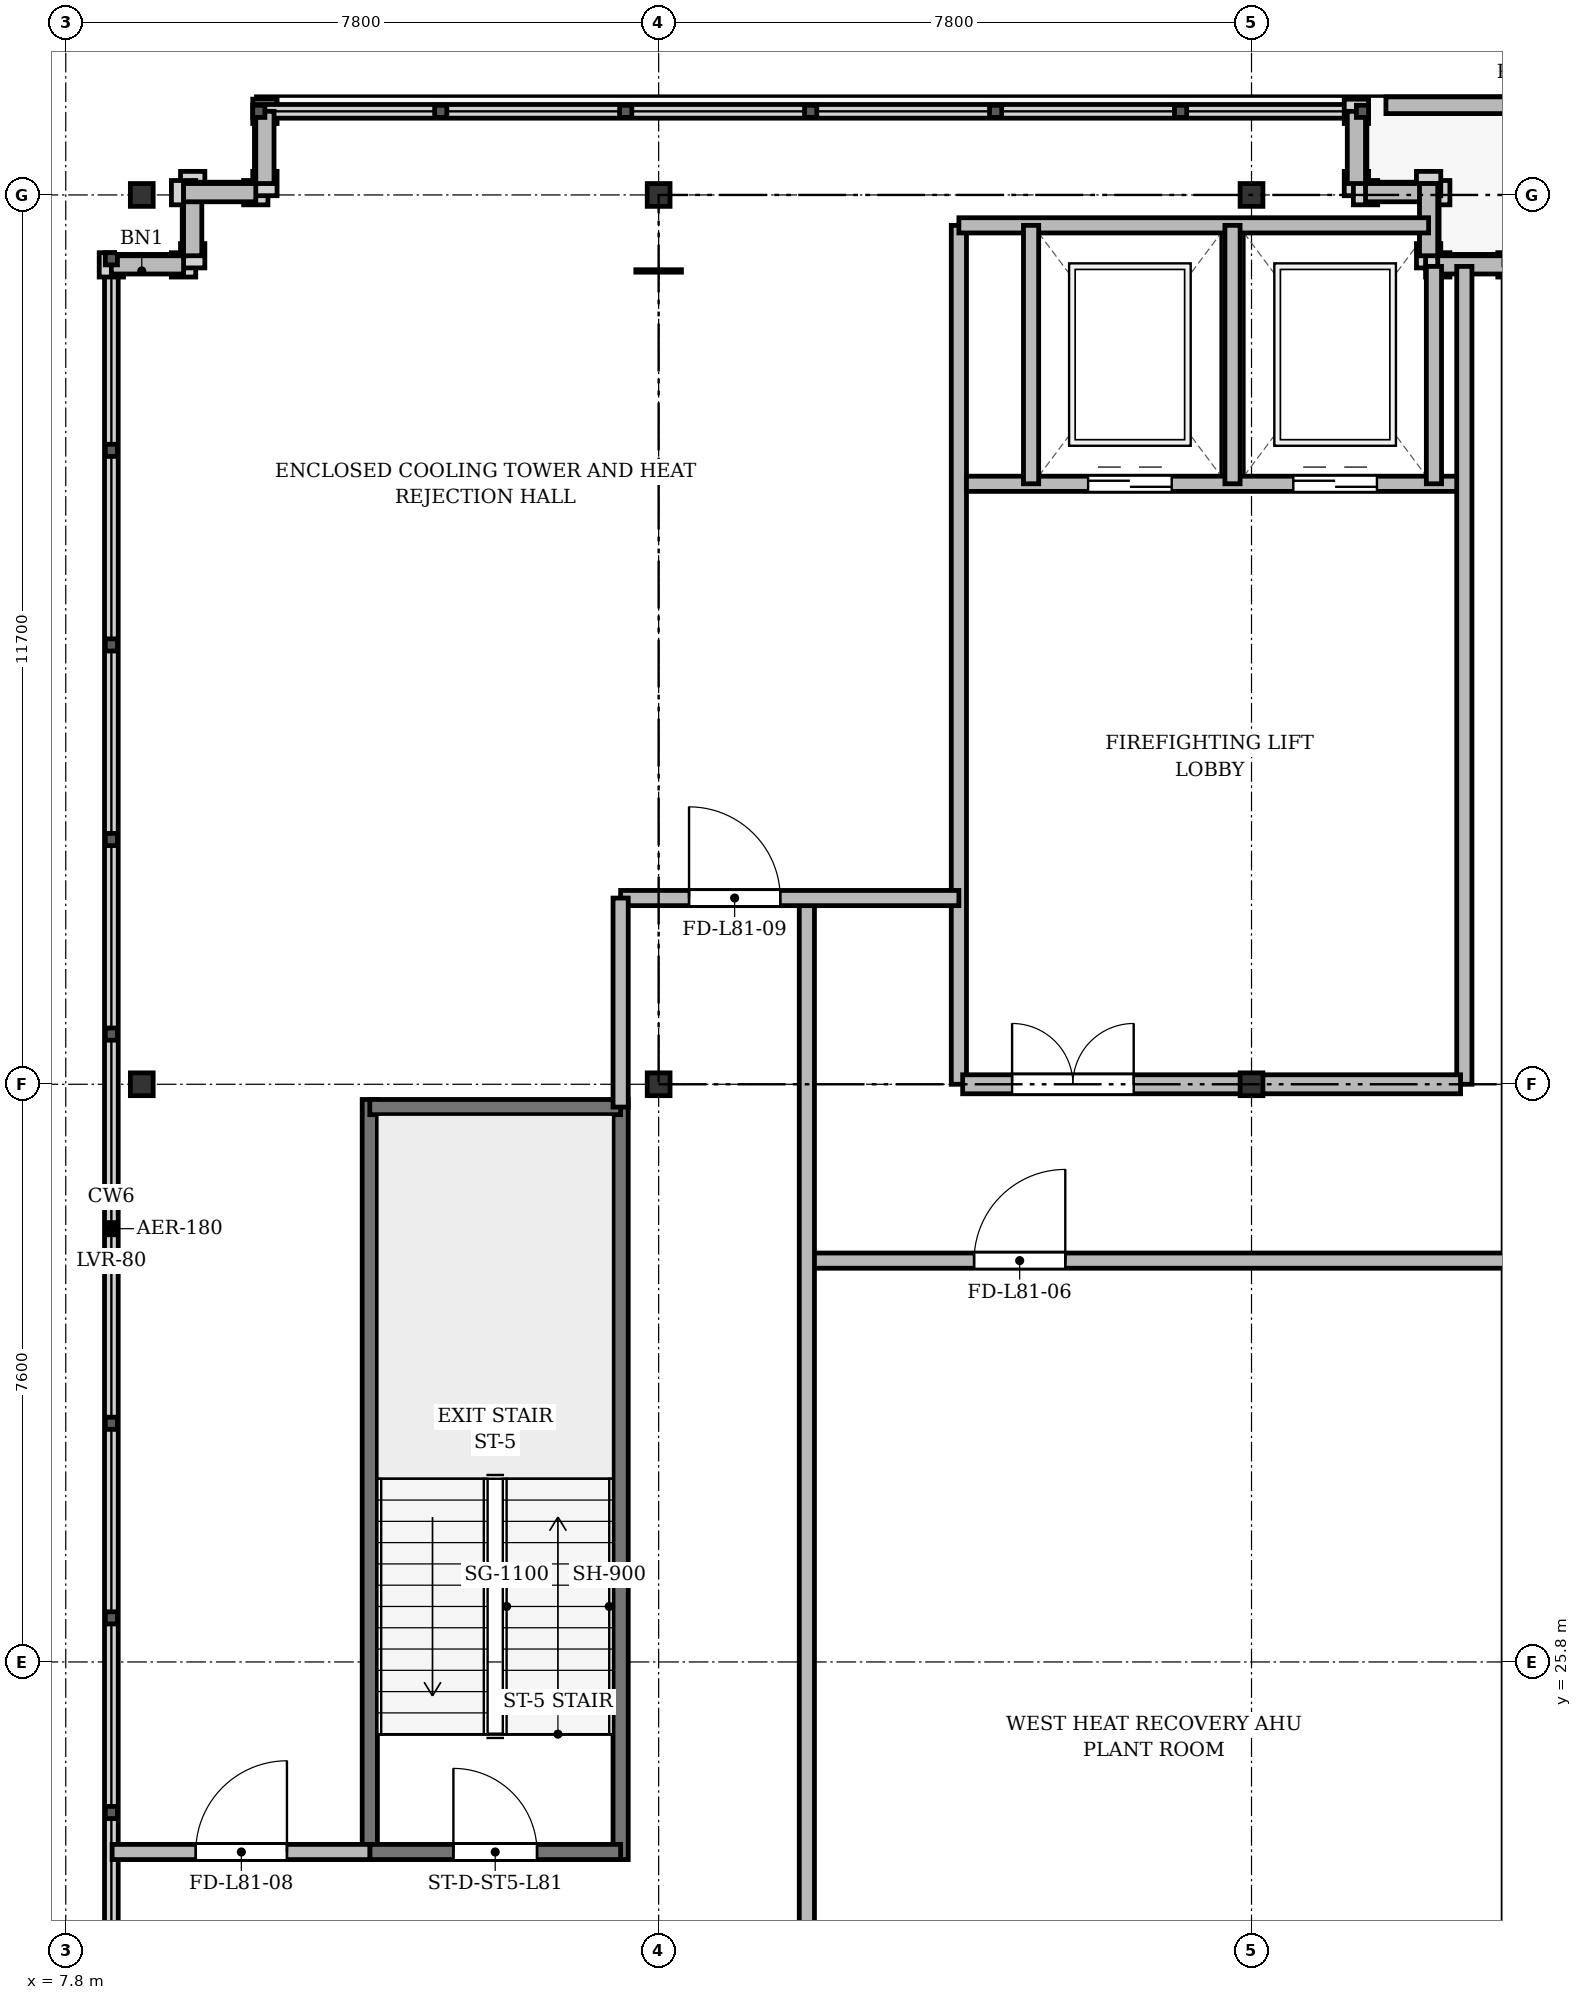
"""IFC4 building model, lengths in metres.
Left out: names, types, materials, properties, quantities, classifications, styles, units other than length and angle.
Written with IfcOpenShell. Run it as: python <this file> out.ifc"""

import sys

from ifc_helpers import new_model, si_unit, direction, frame, frame_2d, origin, origin_2d, place, context, subcontext, project, spatial, rectangle, i_section, extrude, source, transform, mapped, element, fill, save


model = new_model("IFC4")
c1 = context("Model", 3, precision=1e-05, world=origin(), true_north=direction((0.0, 1.0)))
c2 = subcontext(c1, "Body", "Model", "MODEL_VIEW")
j1 = project(units=[si_unit("LENGTHUNIT", "METRE"), si_unit("PLANEANGLEUNIT", "RADIAN")], contexts=[c1])
p1 = place(None, origin())
s1 = spatial("IfcSite", under=j1, at=p1, CompositionType="ELEMENT")
p2 = place(p1, origin())
s2 = spatial("IfcBuilding", under=s1, at=p2, CompositionType="ELEMENT")
p3 = place(p2, frame((0.0, 0.0, 312.3)))
s3 = spatial("IfcBuildingStorey", under=s2, at=p3, CompositionType="ELEMENT", Elevation=312.3)
m1 = source(origin(), c2, "Body", "SweptSolid", [
    extrude(i_section(OverallWidth=0.3, OverallDepth=0.3, WebThickness=0.015, FlangeThickness=0.024, at=origin_2d()), origin(), (0.0, 0.0, 1.0), 4.4),
])
for number, where, z_axis, x_axis in (
    (1, (8.8, 33.4, 0.0), (0.0, 0.0, 1.0), (1.0, 0.0, 0.0)),
    (2, (8.8, 45.1, 0.0), (0.0, 0.0, 1.0), (1.0, 0.0, 0.0)),
    (3, (15.6, 33.4, 0.0), (0.0, 0.0, 1.0), (1.0, 0.0, 0.0)),
    (4, (15.6, 45.1, 0.0), (0.0, 0.0, 1.0), (1.0, 0.0, 0.0)),
    (5, (23.4, 33.4, 0.0), (0.0, 0.0, 1.0), (1.0, 0.0, 0.0)),
    (6, (23.4, 45.1, 0.0), (0.0, 0.0, 1.0), (1.0, 0.0, 0.0)),
):
    element("IfcColumn", number, at=place(p3, frame(where, z_axis=z_axis, x_axis=x_axis)), inside=s3, PredefinedType="COLUMN", context=c2, shape_type="MappedRepresentation", body=[
        mapped(m1, transform((0.0, 0.0, 0.0), x_axis=(1.0, 0.0, 0.0), y_axis=(0.0, 1.0, 0.0), z_axis=(0.0, 0.0, 1.0), scale=1.0)),
    ])
p4 = place(p3, frame((8.4, 44.18, 0.0), z_axis=(0.0, 0.0, 1.0), x_axis=(1.0, 0.0, 0.0)))
e7 = element("IfcWall", 7, at=p4, inside=s3, PredefinedType="SOLIDWALL", context=c2, shape_type="SweptSolid", body=[
    extrude(rectangle(XDim=0.95, YDim=0.24, at=frame_2d((0.475, 0.0))), origin(), (0.0, 0.0, 1.0), 3.61),
])
for number, where, z_axis, x_axis in (
    (8, (9.47, 44.3, 0.0), (0.0, 0.0, 1.0), (0.0, 1.0, 0.0)),
    (9, (9.35, 45.13, 0.0), (0.0, 0.0, 1.0), (1.0, 0.0, 0.0)),
):
    element("IfcWall", number, at=place(p3, frame(where, z_axis=z_axis, x_axis=x_axis)), inside=s3, PredefinedType="SOLIDWALL", context=c2, shape_type="SweptSolid", body=[
        extrude(rectangle(XDim=0.95, YDim=0.24, at=frame_2d((0.475, 0.0))), origin(), (0.0, 0.0, 1.0), 3.61),
    ])
for number, where, z_axis, x_axis in (
    (10, (10.42, 45.25, 0.0), (0.0, 0.0, 1.0), (0.0, 1.0, 0.0)),
    (11, (24.78, 46.2, 0.0), (0.0, 0.0, 1.0), (0.0, -1.0, 0.0)),
):
    element("IfcWall", number, at=place(p3, frame(where, z_axis=z_axis, x_axis=x_axis)), inside=s3, PredefinedType="SOLIDWALL", context=c2, shape_type="SweptSolid", body=[
        extrude(rectangle(XDim=0.95, YDim=0.24, at=frame_2d((0.475, 0.0))), origin(), (0.0, 0.0, 1.0), 4.11),
    ])
p5 = place(p3, frame((24.9, 45.13, 0.0), z_axis=(0.0, 0.0, 1.0), x_axis=(1.0, 0.0, 0.0)))
e12 = element("IfcWall", 12, at=p5, inside=s3, PredefinedType="SOLIDWALL", context=c2, shape_type="SweptSolid", body=[
    extrude(rectangle(XDim=0.95, YDim=0.24, at=frame_2d((0.475, 0.0))), origin(), (0.0, 0.0, 1.0), 3.61),
])
p6 = place(p3, frame((25.73, 45.25, 0.0), z_axis=(0.0, 0.0, 1.0), x_axis=(0.0, -1.0, 0.0)))
e13 = element("IfcWall", 13, at=p6, inside=s3, PredefinedType="SOLIDWALL", context=c2, shape_type="SweptSolid", body=[
    extrude(rectangle(XDim=0.95, YDim=0.24, at=frame_2d((0.475, 0.0))), origin(), (0.0, 0.0, 1.0), 3.61),
])
p7 = place(p3, frame((25.85, 44.18, 0.0), z_axis=(0.0, 0.0, 1.0), x_axis=(1.0, 0.0, 0.0)))
e14 = element("IfcWall", 14, at=p7, inside=s3, PredefinedType="SOLIDWALL", context=c2, shape_type="SweptSolid", body=[
    extrude(rectangle(XDim=0.95, YDim=0.24, at=frame_2d((0.475, 0.0))), origin(), (0.0, 0.0, 1.0), 4.11),
])
p8 = place(p3, frame((25.168, 46.28, 0.0), z_axis=(0.0, 0.0, 1.0), x_axis=(1.0, 0.0, 0.0)))
e15 = element("IfcWall", 15, at=p8, inside=s3, PredefinedType="PARAPET", context=c2, shape_type="SweptSolid", body=[
    extrude(rectangle(XDim=4.012, YDim=0.22, at=frame_2d((2.006, 0.0))), origin(), (0.0, 0.0, 1.0), 1.08),
])
for number, where, z_axis, x_axis in (
    (16, (11.8, 23.2, 0.0), (0.0, 0.0, 1.0), (0.0, 1.0, 0.0)),
    (17, (15.1, 23.2, 0.0), (0.0, 0.0, 1.0), (0.0, 1.0, 0.0)),
):
    element("IfcWall", number, at=place(p3, frame(where, z_axis=z_axis, x_axis=x_axis)), inside=s3, PredefinedType="SHEAR", context=c2, shape_type="SweptSolid", body=[
        extrude(rectangle(XDim=10.0, YDim=0.2, at=frame_2d((5.0, 0.0))), origin(), (0.0, 0.0, 1.0), 4.11),
    ])
p9 = place(p3, frame((11.8, 33.1, 0.0), z_axis=(0.0, 0.0, 1.0), x_axis=(1.0, 0.0, 0.0)))
e18 = element("IfcWall", 18, at=p9, inside=s3, PredefinedType="SHEAR", context=c2, shape_type="SweptSolid", body=[
    extrude(rectangle(XDim=3.3, YDim=0.2, at=frame_2d((1.65, 0.0))), origin(), (0.0, 0.0, 1.0), 4.11),
])
p10 = place(p3, frame((11.8, 23.3, 0.0), z_axis=(0.0, 0.0, 1.0), x_axis=(1.0, 0.0, 0.0)))
e19 = element("IfcWall", 19, at=p10, inside=s3, PredefinedType="SHEAR", context=c2, shape_type="SweptSolid", body=[
    extrude(rectangle(XDim=3.3, YDim=0.2, at=frame_2d((1.65, 0.0))), origin(), (0.0, 0.0, 1.0), 4.11),
])
p11 = place(p10, frame((1.1, 0.0, 0.0)))
e20 = element("IfcOpeningElement", 20, at=p11, cuts=e19, PredefinedType="OPENING", context=c2, shape_type="SweptSolid", body=[
    extrude(rectangle(XDim=1.1, YDim=2.15, at=frame_2d((0.55, 1.075))), frame((0.0, 0.11, 0.0), z_axis=(0.0, -1.0, 0.0), x_axis=(1.0, 0.0, 0.0)), (0.0, 0.0, 1.0), 0.22),
])
p12 = place(p3, frame((19.55, 33.4, 0.0), z_axis=(0.0, 0.0, 1.0), x_axis=(0.0, 1.0, 0.0)))
e21 = element("IfcWall", 21, at=p12, inside=s3, PredefinedType="PARTITIONING", context=c2, shape_type="SweptSolid", body=[
    extrude(rectangle(XDim=11.3, YDim=0.2, at=frame_2d((5.65, 0.0))), origin(), (0.0, 0.0, 1.0), 3.61),
])
p13 = place(p3, frame((19.55, 44.7, 0.0), z_axis=(0.0, 0.0, 1.0), x_axis=(1.0, 0.0, 0.0)))
e22 = element("IfcWall", 22, at=p13, inside=s3, PredefinedType="PARTITIONING", context=c2, shape_type="SweptSolid", body=[
    extrude(rectangle(XDim=6.18, YDim=0.2, at=frame_2d((3.09, 0.0))), origin(), (0.0, 0.0, 1.0), 4.11),
])
p14 = place(p3, frame((19.65, 41.3, 0.0), z_axis=(0.0, 0.0, 1.0), x_axis=(1.0, 0.0, 0.0)))
e23 = element("IfcWall", 23, at=p14, inside=s3, PredefinedType="SOLIDWALL", context=c2, shape_type="SweptSolid", body=[
    extrude(rectangle(XDim=6.5, YDim=0.2, at=frame_2d((3.25, 0.0))), origin(), (0.0, 0.0, 1.0), 4.11),
])
p15 = place(p14, frame((1.6, 0.0, 0.0)))
e24 = element("IfcOpeningElement", 24, at=p15, cuts=e23, PredefinedType="OPENING", context=c2, shape_type="SweptSolid", body=[
    extrude(rectangle(XDim=1.1, YDim=2.15, at=frame_2d((0.55, 1.075))), frame((0.0, 0.11, 0.0), z_axis=(0.0, -1.0, 0.0), x_axis=(1.0, 0.0, 0.0)), (0.0, 0.0, 1.0), 0.22),
])
p16 = place(p14, frame((4.3, 0.0, 0.0)))
e25 = element("IfcOpeningElement", 25, at=p16, cuts=e23, PredefinedType="OPENING", context=c2, shape_type="SweptSolid", body=[
    extrude(rectangle(XDim=1.1, YDim=2.15, at=frame_2d((0.55, 1.075))), frame((0.0, 0.11, 0.0), z_axis=(0.0, -1.0, 0.0), x_axis=(1.0, 0.0, 0.0)), (0.0, 0.0, 1.0), 0.22),
])
for number, where, z_axis, x_axis in (
    (26, (20.5, 41.3, 0.0), (0.0, 0.0, 1.0), (0.0, 1.0, 0.0)),
    (27, (23.15, 41.3, 0.0), (0.0, 0.0, 1.0), (0.0, 1.0, 0.0)),
):
    element("IfcWall", number, at=place(p3, frame(where, z_axis=z_axis, x_axis=x_axis)), inside=s3, PredefinedType="SOLIDWALL", context=c2, shape_type="SweptSolid", body=[
        extrude(rectangle(XDim=3.4, YDim=0.2, at=frame_2d((1.7, 0.0))), origin(), (0.0, 0.0, 1.0), 4.11),
    ])
p17 = place(p3, frame((25.8, 41.3, 0.0), z_axis=(0.0, 0.0, 1.0), x_axis=(0.0, 1.0, 0.0)))
e28 = element("IfcWall", 28, at=p17, inside=s3, PredefinedType="SOLIDWALL", context=c2, shape_type="SweptSolid", body=[
    extrude(rectangle(XDim=2.86, YDim=0.2, at=frame_2d((1.43, 0.0))), origin(), (0.0, 0.0, 1.0), 4.11),
])
p18 = place(p3, frame((26.2, 33.4, 0.0), z_axis=(0.0, 0.0, 1.0), x_axis=(0.0, 1.0, 0.0)))
e29 = element("IfcWall", 29, at=p18, inside=s3, PredefinedType="SOLIDWALL", context=c2, shape_type="SweptSolid", body=[
    extrude(rectangle(XDim=10.76, YDim=0.2, at=frame_2d((5.38, 0.0))), origin(), (0.0, 0.0, 1.0), 3.61),
])
p19 = place(p3, frame((19.6, 33.4, 0.0), z_axis=(0.0, 0.0, 1.0), x_axis=(1.0, 0.0, 0.0)))
e30 = element("IfcWall", 30, at=p19, inside=s3, PredefinedType="PARTITIONING", context=c2, shape_type="SweptSolid", body=[
    extrude(rectangle(XDim=6.55, YDim=0.25, at=frame_2d((3.275, 0.0))), origin(), (0.0, 0.0, 1.0), 3.61),
])
p20 = place(p19, frame((0.65, 0.0, 0.0)))
e31 = element("IfcOpeningElement", 31, at=p20, cuts=e30, PredefinedType="OPENING", context=c2, shape_type="SweptSolid", body=[
    extrude(rectangle(XDim=1.6, YDim=2.2, at=frame_2d((0.8, 1.1))), frame((0.0, 0.135, 0.0), z_axis=(0.0, -1.0, 0.0), x_axis=(1.0, 0.0, 0.0)), (0.0, 0.0, 1.0), 0.27),
])
p21 = place(p3, frame((17.55, 31.08, 0.0), z_axis=(0.0, 0.0, 1.0), x_axis=(1.0, 0.0, 0.0)))
e32 = element("IfcWall", 32, at=p21, inside=s3, PredefinedType="PARTITIONING", context=c2, shape_type="SweptSolid", body=[
    extrude(rectangle(XDim=9.24, YDim=0.2, at=frame_2d((4.62, 0.0))), origin(), (0.0, 0.0, 1.0), 3.61),
])
p22 = place(p21, frame((2.2, 0.0, 0.0)))
e33 = element("IfcOpeningElement", 33, at=p22, cuts=e32, PredefinedType="OPENING", context=c2, shape_type="SweptSolid", body=[
    extrude(rectangle(XDim=1.2, YDim=2.15, at=frame_2d((0.6, 1.075))), frame((0.0, 0.11, 0.0), z_axis=(0.0, -1.0, 0.0), x_axis=(1.0, 0.0, 0.0)), (0.0, 0.0, 1.0), 0.22),
])
p23 = place(p3, frame((17.55, 16.81, 0.0), z_axis=(0.0, 0.0, 1.0), x_axis=(0.0, 1.0, 0.0)))
e34 = element("IfcWall", 34, at=p23, inside=s3, PredefinedType="PARTITIONING", context=c2, shape_type="SweptSolid", body=[
    extrude(rectangle(XDim=19.04, YDim=0.2, at=frame_2d((9.52, 0.0))), origin(), (0.0, 0.0, 1.0), 3.61),
])
p24 = place(p3, frame((8.41, 23.3, 0.0), z_axis=(0.0, 0.0, 1.0), x_axis=(1.0, 0.0, 0.0)))
e35 = element("IfcWall", 35, at=p24, inside=s3, PredefinedType="PARTITIONING", context=c2, shape_type="SweptSolid", body=[
    extrude(rectangle(XDim=3.39, YDim=0.2, at=frame_2d((1.695, 0.0))), origin(), (0.0, 0.0, 1.0), 3.61),
])
p25 = place(p24, frame((1.1, 0.0, 0.0)))
e36 = element("IfcOpeningElement", 36, at=p25, cuts=e35, PredefinedType="OPENING", context=c2, shape_type="SweptSolid", body=[
    extrude(rectangle(XDim=1.2, YDim=2.15, at=frame_2d((0.6, 1.075))), frame((0.0, 0.11, 0.0), z_axis=(0.0, -1.0, 0.0), x_axis=(1.0, 0.0, 0.0)), (0.0, 0.0, 1.0), 0.22),
])
p26 = place(p3, frame((15.1, 35.85, 0.0), z_axis=(0.0, 0.0, 1.0), x_axis=(1.0, 0.0, 0.0)))
e37 = element("IfcWall", 37, at=p26, inside=s3, PredefinedType="PARTITIONING", context=c2, shape_type="SweptSolid", body=[
    extrude(rectangle(XDim=4.45, YDim=0.2, at=frame_2d((2.225, 0.0))), origin(), (0.0, 0.0, 1.0), 3.61),
])
p27 = place(p26, frame((0.9, 0.0, 0.0)))
e38 = element("IfcOpeningElement", 38, at=p27, cuts=e37, PredefinedType="OPENING", context=c2, shape_type="SweptSolid", body=[
    extrude(rectangle(XDim=1.2, YDim=2.15, at=frame_2d((0.6, 1.075))), frame((0.0, 0.11, 0.0), z_axis=(0.0, -1.0, 0.0), x_axis=(1.0, 0.0, 0.0)), (0.0, 0.0, 1.0), 0.22),
])
p28 = place(p3, frame((15.1, 33.1, 0.0), z_axis=(0.0, 0.0, 1.0), x_axis=(0.0, 1.0, 0.0)))
e39 = element("IfcWall", 39, at=p28, inside=s3, PredefinedType="PARTITIONING", context=c2, shape_type="SweptSolid", body=[
    extrude(rectangle(XDim=2.75, YDim=0.2, at=frame_2d((1.375, 0.0))), origin(), (0.0, 0.0, 1.0), 3.61),
])
m2 = source(origin(), c2, "Body", "SweptSolid", [
    extrude(rectangle(XDim=1.1, YDim=2.15, at=frame_2d((0.55, 1.075))), frame((0.0, 0.025, 0.0), z_axis=(0.0, -1.0, 0.0), x_axis=(1.0, 0.0, 0.0)), (0.0, 0.0, 1.0), 0.05),
])
p29 = place(p11, origin())
e40 = element("IfcDoor", 40, at=p29, inside=s3, OperationType="SINGLE_SWING_LEFT", PredefinedType="DOOR", context=c2, shape_type="MappedRepresentation", body=[
    mapped(m2, transform((0.0, 0.0, 0.0), x_axis=(1.0, 0.0, 0.0), y_axis=(0.0, 1.0, 0.0), z_axis=(0.0, 0.0, 1.0), scale=1.0)),
])
fill(e20, e40)
p30 = place(p15, origin())
e41 = element("IfcDoor", 41, at=p30, inside=s3, OperationType="DOUBLE_DOOR_SLIDING", PredefinedType="DOOR", context=c2, shape_type="MappedRepresentation", body=[
    mapped(m2, transform((0.0, 0.0, 0.0), x_axis=(1.0, 0.0, 0.0), y_axis=(0.0, 1.0, 0.0), z_axis=(0.0, 0.0, 1.0), scale=1.0)),
])
fill(e24, e41)
p31 = place(p16, origin())
e42 = element("IfcDoor", 42, at=p31, inside=s3, OperationType="DOUBLE_DOOR_SLIDING", PredefinedType="DOOR", context=c2, shape_type="MappedRepresentation", body=[
    mapped(m2, transform((0.0, 0.0, 0.0), x_axis=(1.0, 0.0, 0.0), y_axis=(0.0, 1.0, 0.0), z_axis=(0.0, 0.0, 1.0), scale=1.0)),
])
fill(e25, e42)
m3 = source(origin(), c2, "Body", "SweptSolid", [
    extrude(rectangle(XDim=1.6, YDim=2.2, at=frame_2d((0.8, 1.1))), frame((0.0, 0.025, 0.0), z_axis=(0.0, -1.0, 0.0), x_axis=(1.0, 0.0, 0.0)), (0.0, 0.0, 1.0), 0.05),
])
p32 = place(p20, origin())
e43 = element("IfcDoor", 43, at=p32, inside=s3, OperationType="DOUBLE_DOOR_SINGLE_SWING", PredefinedType="DOOR", context=c2, shape_type="MappedRepresentation", body=[
    mapped(m3, transform((0.0, 0.0, 0.0), x_axis=(1.0, 0.0, 0.0), y_axis=(0.0, 1.0, 0.0), z_axis=(0.0, 0.0, 1.0), scale=1.0)),
])
fill(e31, e43)
m4 = source(origin(), c2, "Body", "SweptSolid", [
    extrude(rectangle(XDim=1.2, YDim=2.15, at=frame_2d((0.6, 1.075))), frame((0.0, 0.025, 0.0), z_axis=(0.0, -1.0, 0.0), x_axis=(1.0, 0.0, 0.0)), (0.0, 0.0, 1.0), 0.05),
])
p33 = place(p22, origin())
e44 = element("IfcDoor", 44, at=p33, inside=s3, OperationType="SINGLE_SWING_RIGHT", PredefinedType="DOOR", context=c2, shape_type="MappedRepresentation", body=[
    mapped(m4, transform((0.0, 0.0, 0.0), x_axis=(1.0, 0.0, 0.0), y_axis=(0.0, 1.0, 0.0), z_axis=(0.0, 0.0, 1.0), scale=1.0)),
])
fill(e33, e44)
p34 = place(p25, origin())
e45 = element("IfcDoor", 45, at=p34, inside=s3, OperationType="SINGLE_SWING_RIGHT", PredefinedType="DOOR", context=c2, shape_type="MappedRepresentation", body=[
    mapped(m4, transform((0.0, 0.0, 0.0), x_axis=(1.0, 0.0, 0.0), y_axis=(0.0, 1.0, 0.0), z_axis=(0.0, 0.0, 1.0), scale=1.0)),
])
fill(e36, e45)
p35 = place(p27, origin())
e46 = element("IfcDoor", 46, at=p35, inside=s3, OperationType="SINGLE_SWING_LEFT", PredefinedType="DOOR", context=c2, shape_type="MappedRepresentation", body=[
    mapped(m4, transform((0.0, 0.0, 0.0), x_axis=(1.0, 0.0, 0.0), y_axis=(0.0, 1.0, 0.0), z_axis=(0.0, 0.0, 1.0), scale=1.0)),
])
fill(e38, e46)
save(model, sys.argv[1])
